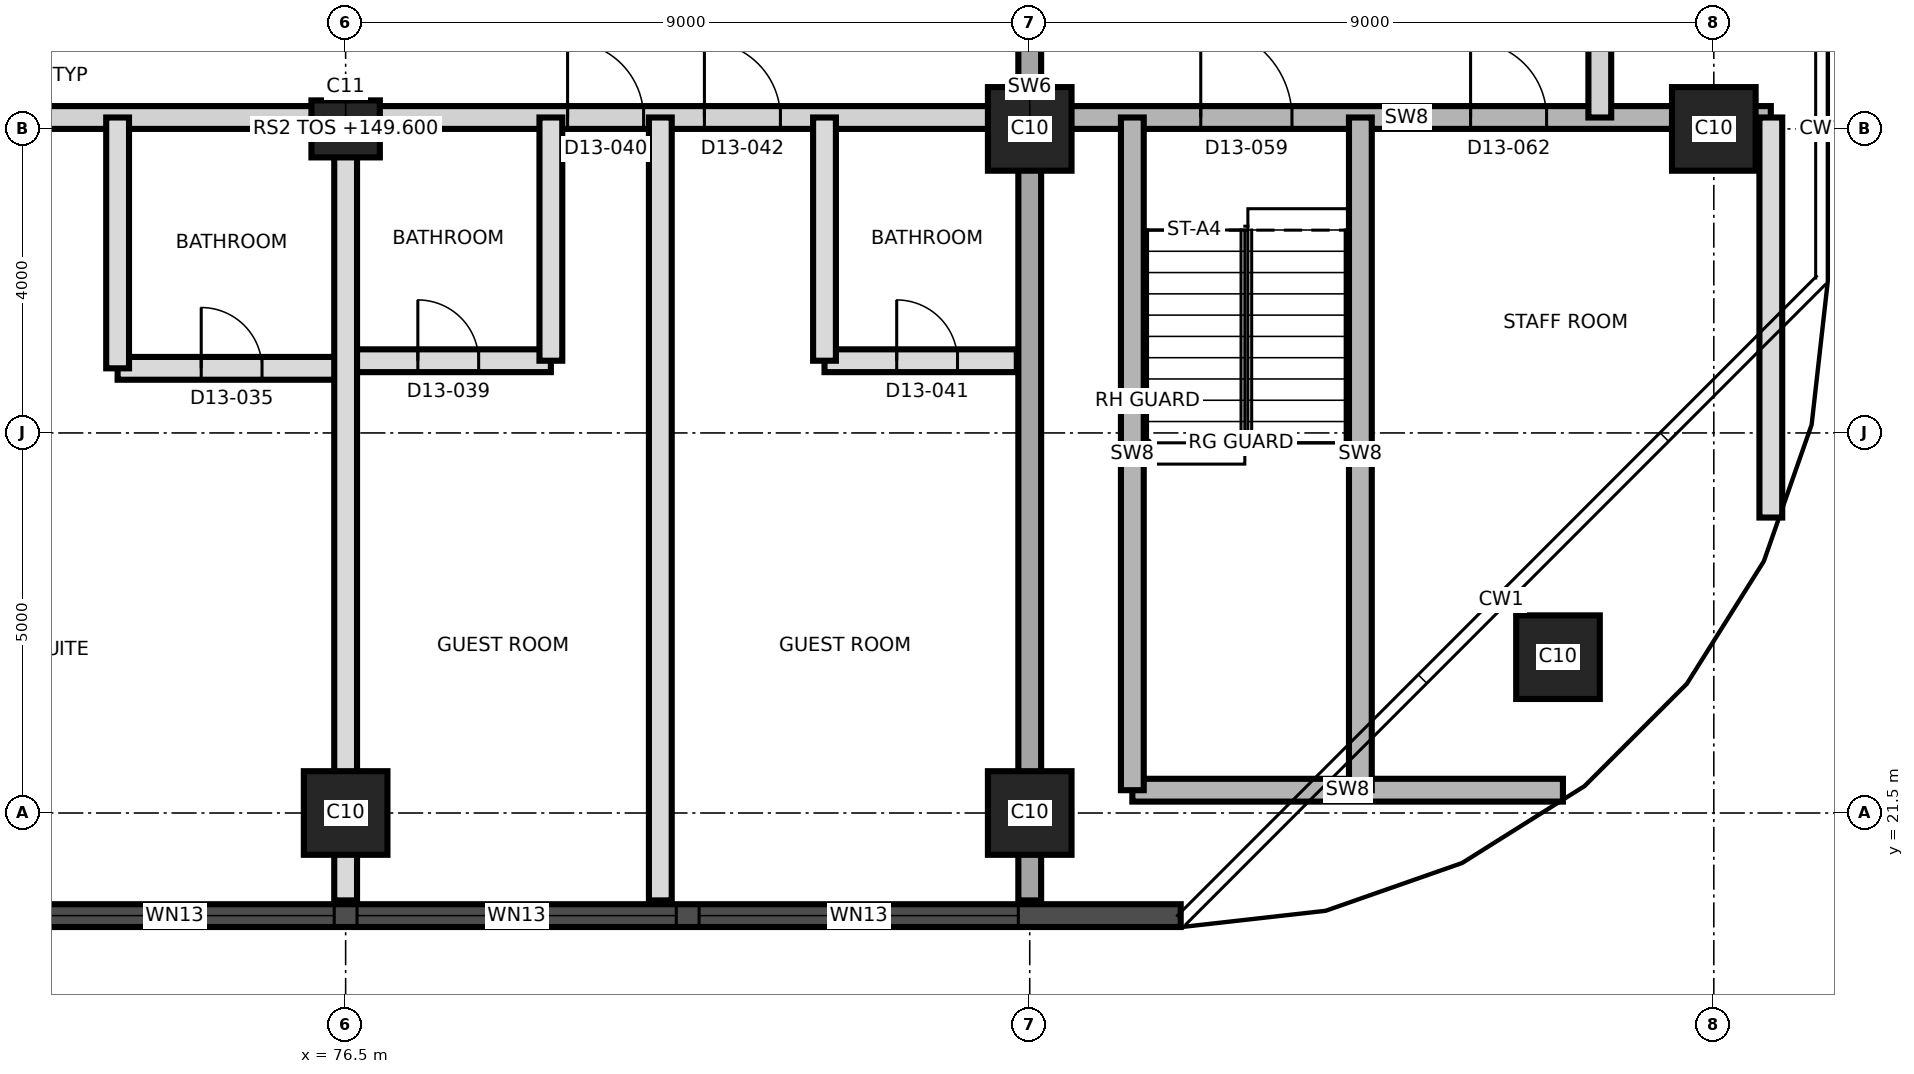
"""IFC4 building model, lengths in metres.
Left out: names, types, materials, properties, quantities, classifications, styles, units other than length and angle.
Written with IfcOpenShell. Run it as: python <this file> out.ifc"""

import sys

from ifc_helpers import new_model, si_unit, direction, frame, frame_2d, origin, origin_2d, place, context, subcontext, project, spatial, rectangle, extrude, element, fill, save


model = new_model("IFC4")
c1 = context("Model", 3, precision=1e-05, world=origin(), true_north=direction((0.0, 1.0)))
c2 = subcontext(c1, "Body", "Model", "MODEL_VIEW")
j1 = project(units=[si_unit("LENGTHUNIT", "METRE"), si_unit("PLANEANGLEUNIT", "RADIAN")], contexts=[c1])
p1 = place(None, origin())
s1 = spatial("IfcSite", under=j1, at=p1, CompositionType="ELEMENT")
p2 = place(p1, origin())
s2 = spatial("IfcBuilding", under=s1, at=p2, CompositionType="ELEMENT")
p3 = place(p2, frame((0.0, 0.0, 145.9)))
s3 = spatial("IfcBuildingStorey", under=s2, at=p3, CompositionType="ELEMENT", Elevation=145.9)
for number, where, z_axis, x_axis in (
    (1, (76.5, 21.5, 0.0), (0.0, 0.0, 1.0), (1.0, 0.0, 0.0)),
    (2, (85.5, 21.5, 0.0), (0.0, 0.0, 1.0), (1.0, 0.0, 0.0)),
    (3, (92.45, 23.55, 0.0), (0.0, 0.0, 1.0), (1.0, 0.0, 0.0)),
):
    element("IfcColumn", number, at=place(p3, frame(where, z_axis=z_axis, x_axis=x_axis)), inside=s3, PredefinedType="COLUMN", context=c2, shape_type="SweptSolid", body=[
        extrude(rectangle(XDim=1.1, YDim=1.1, at=origin_2d()), origin(), (0.0, 0.0, 1.0), 3.7),
    ])
p4 = place(p3, frame((76.5, 30.5, 0.0), z_axis=(0.0, 0.0, 1.0), x_axis=(1.0, 0.0, 0.0)))
e4 = element("IfcColumn", 4, at=p4, inside=s3, PredefinedType="COLUMN", context=c2, shape_type="SweptSolid", body=[
    extrude(rectangle(XDim=0.9, YDim=0.75, at=origin_2d()), origin(), (0.0, 0.0, 1.0), 3.7),
])
for number, where, z_axis, x_axis in (
    (5, (85.5, 30.5, 0.0), (0.0, 0.0, 1.0), (1.0, 0.0, 0.0)),
    (6, (94.5, 30.5, 0.0), (0.0, 0.0, 1.0), (1.0, 0.0, 0.0)),
):
    element("IfcColumn", number, at=place(p3, frame(where, z_axis=z_axis, x_axis=x_axis)), inside=s3, PredefinedType="COLUMN", context=c2, shape_type="SweptSolid", body=[
        extrude(rectangle(XDim=1.1, YDim=1.1, at=origin_2d()), origin(), (0.0, 0.0, 1.0), 3.7),
    ])
p5 = place(p3, frame((85.5, 20.35, 0.0), z_axis=(0.0, 0.0, 1.0), x_axis=(0.0, 1.0, 0.0)))
e7 = element("IfcWall", 7, at=p5, inside=s3, PredefinedType="SHEAR", context=c2, shape_type="SweptSolid", body=[
    extrude(rectangle(XDim=20.3, YDim=0.3, at=frame_2d((10.15, 0.0))), origin(), (0.0, 0.0, 1.0), 3.7),
])
p6 = place(p5, frame((11.35, 0.0, 0.0)))
e8 = element("IfcOpeningElement", 8, at=p6, cuts=e7, PredefinedType="OPENING", context=c2, shape_type="SweptSolid", body=[
    extrude(rectangle(XDim=1.4, YDim=2.1, at=frame_2d((0.7, 1.05))), frame((0.0, 0.16, 0.0), z_axis=(0.0, -1.0, 0.0), x_axis=(1.0, 0.0, 0.0)), (0.0, 0.0, 1.0), 0.32),
])
p7 = place(p3, frame((44.011, 20.15, 0.0), z_axis=(0.0, 0.0, 1.0), x_axis=(1.0, 0.0, 0.0)))
e9 = element("IfcWall", 9, at=p7, inside=s3, PredefinedType="SOLIDWALL", context=c2, shape_type="SweptSolid", body=[
    extrude(rectangle(XDim=43.476, YDim=0.3, at=frame_2d((21.738, 0.0))), origin(), (0.0, 0.0, 1.0), 3.4),
])
p8 = place(p7, frame((1.845, 0.0, 0.3)))
e10 = element("IfcOpeningElement", 10, at=p8, cuts=e9, PredefinedType="OPENING", context=c2, shape_type="SweptSolid", body=[
    extrude(rectangle(XDim=1.8, YDim=2.4, at=frame_2d((0.9, 1.2))), frame((0.0, 0.16, 0.0), z_axis=(0.0, -1.0, 0.0), x_axis=(1.0, 0.0, 0.0)), (0.0, 0.0, 1.0), 0.32),
])
p9 = place(p7, frame((5.639, 0.0, 0.9)))
e11 = element("IfcOpeningElement", 11, at=p9, cuts=e9, PredefinedType="OPENING", context=c2, shape_type="SweptSolid", body=[
    extrude(rectangle(XDim=4.2, YDim=1.7, at=frame_2d((2.1, 0.85))), frame((0.0, 0.16, 0.0), z_axis=(0.0, -1.0, 0.0), x_axis=(1.0, 0.0, 0.0)), (0.0, 0.0, 1.0), 0.32),
])
p10 = place(p7, frame((10.139, 0.0, 0.9)))
e12 = element("IfcOpeningElement", 12, at=p10, cuts=e9, PredefinedType="OPENING", context=c2, shape_type="SweptSolid", body=[
    extrude(rectangle(XDim=4.2, YDim=1.7, at=frame_2d((2.1, 0.85))), frame((0.0, 0.16, 0.0), z_axis=(0.0, -1.0, 0.0), x_axis=(1.0, 0.0, 0.0)), (0.0, 0.0, 1.0), 0.32),
])
p11 = place(p7, frame((14.639, 0.0, 0.9)))
e13 = element("IfcOpeningElement", 13, at=p11, cuts=e9, PredefinedType="OPENING", context=c2, shape_type="SweptSolid", body=[
    extrude(rectangle(XDim=4.2, YDim=1.7, at=frame_2d((2.1, 0.85))), frame((0.0, 0.16, 0.0), z_axis=(0.0, -1.0, 0.0), x_axis=(1.0, 0.0, 0.0)), (0.0, 0.0, 1.0), 0.32),
])
p12 = place(p7, frame((19.139, 0.0, 0.9)))
e14 = element("IfcOpeningElement", 14, at=p12, cuts=e9, PredefinedType="OPENING", context=c2, shape_type="SweptSolid", body=[
    extrude(rectangle(XDim=4.2, YDim=1.7, at=frame_2d((2.1, 0.85))), frame((0.0, 0.16, 0.0), z_axis=(0.0, -1.0, 0.0), x_axis=(1.0, 0.0, 0.0)), (0.0, 0.0, 1.0), 0.32),
])
p13 = place(p7, frame((23.639, 0.0, 0.9)))
e15 = element("IfcOpeningElement", 15, at=p13, cuts=e9, PredefinedType="OPENING", context=c2, shape_type="SweptSolid", body=[
    extrude(rectangle(XDim=4.2, YDim=1.7, at=frame_2d((2.1, 0.85))), frame((0.0, 0.16, 0.0), z_axis=(0.0, -1.0, 0.0), x_axis=(1.0, 0.0, 0.0)), (0.0, 0.0, 1.0), 0.32),
])
p14 = place(p7, frame((28.139, 0.0, 0.9)))
e16 = element("IfcOpeningElement", 16, at=p14, cuts=e9, PredefinedType="OPENING", context=c2, shape_type="SweptSolid", body=[
    extrude(rectangle(XDim=4.2, YDim=1.7, at=frame_2d((2.1, 0.85))), frame((0.0, 0.16, 0.0), z_axis=(0.0, -1.0, 0.0), x_axis=(1.0, 0.0, 0.0)), (0.0, 0.0, 1.0), 0.32),
])
p15 = place(p7, frame((32.639, 0.0, 0.9)))
e17 = element("IfcOpeningElement", 17, at=p15, cuts=e9, PredefinedType="OPENING", context=c2, shape_type="SweptSolid", body=[
    extrude(rectangle(XDim=4.2, YDim=1.7, at=frame_2d((2.1, 0.85))), frame((0.0, 0.16, 0.0), z_axis=(0.0, -1.0, 0.0), x_axis=(1.0, 0.0, 0.0)), (0.0, 0.0, 1.0), 0.32),
])
p16 = place(p7, frame((37.139, 0.0, 0.9)))
e18 = element("IfcOpeningElement", 18, at=p16, cuts=e9, PredefinedType="OPENING", context=c2, shape_type="SweptSolid", body=[
    extrude(rectangle(XDim=4.2, YDim=1.7, at=frame_2d((2.1, 0.85))), frame((0.0, 0.16, 0.0), z_axis=(0.0, -1.0, 0.0), x_axis=(1.0, 0.0, 0.0)), (0.0, 0.0, 1.0), 0.32),
])
p17 = place(p3, frame((86.85, 21.8, 0.0), z_axis=(0.0, 0.0, 1.0), x_axis=(1.0, 0.0, 0.0)))
e19 = element("IfcWall", 19, at=p17, inside=s3, PredefinedType="SHEAR", context=c2, shape_type="SweptSolid", body=[
    extrude(rectangle(XDim=5.665, YDim=0.3, at=frame_2d((2.833, 0.0))), origin(), (0.0, 0.0, 1.0), 3.4),
])
p18 = place(p3, frame((73.5, 27.35, 0.0), z_axis=(0.0, 0.0, 1.0), x_axis=(1.0, 0.0, 0.0)))
e20 = element("IfcWall", 20, at=p18, inside=s3, PredefinedType="PARTITIONING", context=c2, shape_type="SweptSolid", body=[
    extrude(rectangle(XDim=3.0, YDim=0.3, at=frame_2d((1.5, 0.0))), origin(), (0.0, 0.0, 1.0), 3.3),
])
p19 = place(p18, frame((1.1, 0.0, 0.0)))
e21 = element("IfcOpeningElement", 21, at=p19, cuts=e20, PredefinedType="OPENING", context=c2, shape_type="SweptSolid", body=[
    extrude(rectangle(XDim=0.8, YDim=2.1, at=frame_2d((0.4, 1.05))), frame((0.0, 0.16, 0.0), z_axis=(0.0, -1.0, 0.0), x_axis=(1.0, 0.0, 0.0)), (0.0, 0.0, 1.0), 0.32),
])
p20 = place(p3, frame((76.5, 27.45, 0.0), z_axis=(0.0, 0.0, 1.0), x_axis=(1.0, 0.0, 0.0)))
e22 = element("IfcWall", 22, at=p20, inside=s3, PredefinedType="PARTITIONING", context=c2, shape_type="SweptSolid", body=[
    extrude(rectangle(XDim=2.7, YDim=0.3, at=frame_2d((1.35, 0.0))), origin(), (0.0, 0.0, 1.0), 3.3),
])
p21 = place(p20, frame((0.95, 0.0, 0.0)))
e23 = element("IfcOpeningElement", 23, at=p21, cuts=e22, PredefinedType="OPENING", context=c2, shape_type="SweptSolid", body=[
    extrude(rectangle(XDim=0.8, YDim=2.1, at=frame_2d((0.4, 1.05))), frame((0.0, 0.16, 0.0), z_axis=(0.0, -1.0, 0.0), x_axis=(1.0, 0.0, 0.0)), (0.0, 0.0, 1.0), 0.32),
])
p22 = place(p3, frame((82.8, 27.45, 0.0), z_axis=(0.0, 0.0, 1.0), x_axis=(1.0, 0.0, 0.0)))
e24 = element("IfcWall", 24, at=p22, inside=s3, PredefinedType="PARTITIONING", context=c2, shape_type="SweptSolid", body=[
    extrude(rectangle(XDim=2.53, YDim=0.3, at=frame_2d((1.265, 0.0))), origin(), (0.0, 0.0, 1.0), 3.3),
])
p23 = place(p22, frame((0.95, 0.0, 0.0)))
e25 = element("IfcOpeningElement", 25, at=p23, cuts=e24, PredefinedType="OPENING", context=c2, shape_type="SweptSolid", body=[
    extrude(rectangle(XDim=0.8, YDim=2.1, at=frame_2d((0.4, 1.05))), frame((0.0, 0.16, 0.0), z_axis=(0.0, -1.0, 0.0), x_axis=(1.0, 0.0, 0.0)), (0.0, 0.0, 1.0), 0.32),
])
p24 = place(p3, frame((58.65, 30.65, 0.0), z_axis=(0.0, 0.0, 1.0), x_axis=(1.0, 0.0, 0.0)))
e26 = element("IfcWall", 26, at=p24, inside=s3, PredefinedType="PARTITIONING", context=c2, shape_type="SweptSolid", body=[
    extrude(rectangle(XDim=26.68, YDim=0.3, at=frame_2d((13.34, 0.0))), origin(), (0.0, 0.0, 1.0), 3.3),
])
p25 = place(p24, frame((2.2, 0.0, 0.0)))
e27 = element("IfcOpeningElement", 27, at=p25, cuts=e26, PredefinedType="OPENING", context=c2, shape_type="SweptSolid", body=[
    extrude(rectangle(XDim=1.0, YDim=2.4, at=frame_2d((0.5, 1.2))), frame((0.0, 0.16, 0.0), z_axis=(0.0, -1.0, 0.0), x_axis=(1.0, 0.0, 0.0)), (0.0, 0.0, 1.0), 0.32),
])
p26 = place(p24, frame((12.85, 0.0, 0.0)))
e28 = element("IfcOpeningElement", 28, at=p26, cuts=e26, PredefinedType="OPENING", context=c2, shape_type="SweptSolid", body=[
    extrude(rectangle(XDim=1.0, YDim=2.4, at=frame_2d((0.5, 1.2))), frame((0.0, 0.16, 0.0), z_axis=(0.0, -1.0, 0.0), x_axis=(1.0, 0.0, 0.0)), (0.0, 0.0, 1.0), 0.32),
])
p27 = place(p24, frame((20.77, 0.0, 0.0)))
e29 = element("IfcOpeningElement", 29, at=p27, cuts=e26, PredefinedType="OPENING", context=c2, shape_type="SweptSolid", body=[
    extrude(rectangle(XDim=1.0, YDim=2.1, at=frame_2d((0.5, 1.05))), frame((0.0, 0.16, 0.0), z_axis=(0.0, -1.0, 0.0), x_axis=(1.0, 0.0, 0.0)), (0.0, 0.0, 1.0), 0.32),
])
p28 = place(p24, frame((22.57, 0.0, 0.0)))
e30 = element("IfcOpeningElement", 30, at=p28, cuts=e26, PredefinedType="OPENING", context=c2, shape_type="SweptSolid", body=[
    extrude(rectangle(XDim=1.0, YDim=2.1, at=frame_2d((0.5, 1.05))), frame((0.0, 0.16, 0.0), z_axis=(0.0, -1.0, 0.0), x_axis=(1.0, 0.0, 0.0)), (0.0, 0.0, 1.0), 0.32),
])
p29 = place(p3, frame((85.67, 30.65, 0.0), z_axis=(0.0, 0.0, 1.0), x_axis=(1.0, 0.0, 0.0)))
e31 = element("IfcWall", 31, at=p29, inside=s3, PredefinedType="SHEAR", context=c2, shape_type="SweptSolid", body=[
    extrude(rectangle(XDim=9.58, YDim=0.3, at=frame_2d((4.79, 0.0))), origin(), (0.0, 0.0, 1.0), 3.4),
])
p30 = place(p29, frame((2.08, 0.0, 0.0)))
e32 = element("IfcOpeningElement", 32, at=p30, cuts=e31, PredefinedType="OPENING", context=c2, shape_type="SweptSolid", body=[
    extrude(rectangle(XDim=1.2, YDim=2.1, at=frame_2d((0.6, 1.05))), frame((0.0, 0.16, 0.0), z_axis=(0.0, -1.0, 0.0), x_axis=(1.0, 0.0, 0.0)), (0.0, 0.0, 1.0), 0.32),
])
p31 = place(p29, frame((5.63, 0.0, 0.0)))
e33 = element("IfcOpeningElement", 33, at=p31, cuts=e31, PredefinedType="OPENING", context=c2, shape_type="SweptSolid", body=[
    extrude(rectangle(XDim=1.0, YDim=2.1, at=frame_2d((0.5, 1.05))), frame((0.0, 0.16, 0.0), z_axis=(0.0, -1.0, 0.0), x_axis=(1.0, 0.0, 0.0)), (0.0, 0.0, 1.0), 0.32),
])
p32 = place(p3, frame((73.5, 27.35, 0.0), z_axis=(0.0, 0.0, 1.0), x_axis=(0.0, 1.0, 0.0)))
e34 = element("IfcWall", 34, at=p32, inside=s3, PredefinedType="PARTITIONING", context=c2, shape_type="SweptSolid", body=[
    extrude(rectangle(XDim=3.3, YDim=0.3, at=frame_2d((1.65, 0.0))), origin(), (0.0, 0.0, 1.0), 3.3),
])
p33 = place(p3, frame((76.5, 20.35, 0.0), z_axis=(0.0, 0.0, 1.0), x_axis=(0.0, 1.0, 0.0)))
e35 = element("IfcWall", 35, at=p33, inside=s3, PredefinedType="PARTITIONING", context=c2, shape_type="SweptSolid", body=[
    extrude(rectangle(XDim=10.3, YDim=0.3, at=frame_2d((5.15, 0.0))), origin(), (0.0, 0.0, 1.0), 3.3),
])
p34 = place(p3, frame((79.2, 27.45, 0.0), z_axis=(0.0, 0.0, 1.0), x_axis=(0.0, 1.0, 0.0)))
e36 = element("IfcWall", 36, at=p34, inside=s3, PredefinedType="PARTITIONING", context=c2, shape_type="SweptSolid", body=[
    extrude(rectangle(XDim=3.2, YDim=0.3, at=frame_2d((1.6, 0.0))), origin(), (0.0, 0.0, 1.0), 3.3),
])
p35 = place(p3, frame((80.64, 20.35, 0.0), z_axis=(0.0, 0.0, 1.0), x_axis=(0.0, 1.0, 0.0)))
e37 = element("IfcWall", 37, at=p35, inside=s3, PredefinedType="PARTITIONING", context=c2, shape_type="SweptSolid", body=[
    extrude(rectangle(XDim=10.3, YDim=0.3, at=frame_2d((5.15, 0.0))), origin(), (0.0, 0.0, 1.0), 3.3),
])
p36 = place(p3, frame((82.8, 27.45, 0.0), z_axis=(0.0, 0.0, 1.0), x_axis=(0.0, 1.0, 0.0)))
e38 = element("IfcWall", 38, at=p36, inside=s3, PredefinedType="PARTITIONING", context=c2, shape_type="SweptSolid", body=[
    extrude(rectangle(XDim=3.2, YDim=0.3, at=frame_2d((1.6, 0.0))), origin(), (0.0, 0.0, 1.0), 3.3),
])
for number, where, z_axis, x_axis in (
    (39, (86.85, 21.8, 0.0), (0.0, 0.0, 1.0), (0.0, 1.0, 0.0)),
    (40, (89.85, 21.8, 0.0), (0.0, 0.0, 1.0), (0.0, 1.0, 0.0)),
):
    element("IfcWall", number, at=place(p3, frame(where, z_axis=z_axis, x_axis=x_axis)), inside=s3, PredefinedType="SHEAR", context=c2, shape_type="SweptSolid", body=[
        extrude(rectangle(XDim=8.85, YDim=0.3, at=frame_2d((4.425, 0.0))), origin(), (0.0, 0.0, 1.0), 3.4),
    ])
p37 = place(p3, frame((93.0, 30.65, 0.0), z_axis=(0.0, 0.0, 1.0), x_axis=(0.0, 1.0, 0.0)))
e41 = element("IfcWall", 41, at=p37, inside=s3, PredefinedType="PARTITIONING", context=c2, shape_type="SweptSolid", body=[
    extrude(rectangle(XDim=2.7, YDim=0.3, at=frame_2d((1.35, 0.0))), origin(), (0.0, 0.0, 1.0), 3.4),
])
p38 = place(p3, frame((95.25, 25.387, 0.0), z_axis=(0.0, 0.0, 1.0), x_axis=(0.0, 1.0, 0.0)))
e42 = element("IfcWall", 42, at=p38, inside=s3, PredefinedType="PARTITIONING", context=c2, shape_type="SweptSolid", body=[
    extrude(rectangle(XDim=5.263, YDim=0.3, at=frame_2d((2.631, 0.0))), origin(), (0.0, 0.0, 1.0), 3.4),
])
p39 = place(p14, origin())
e43 = element("IfcWindow", 43, at=p39, inside=s3, PartitioningType="SINGLE_PANEL", PredefinedType="WINDOW", context=c2, shape_type="SweptSolid", body=[
    extrude(rectangle(XDim=4.2, YDim=1.7, at=frame_2d((2.1, 0.85))), frame((0.0, 0.03, 0.0), z_axis=(0.0, -1.0, 0.0), x_axis=(1.0, 0.0, 0.0)), (0.0, 0.0, 1.0), 0.06),
])
fill(e16, e43)
p40 = place(p15, origin())
e44 = element("IfcWindow", 44, at=p40, inside=s3, PartitioningType="SINGLE_PANEL", PredefinedType="WINDOW", context=c2, shape_type="SweptSolid", body=[
    extrude(rectangle(XDim=4.2, YDim=1.7, at=frame_2d((2.1, 0.85))), frame((0.0, 0.03, 0.0), z_axis=(0.0, -1.0, 0.0), x_axis=(1.0, 0.0, 0.0)), (0.0, 0.0, 1.0), 0.06),
])
fill(e17, e44)
p41 = place(p16, origin())
e45 = element("IfcWindow", 45, at=p41, inside=s3, PartitioningType="SINGLE_PANEL", PredefinedType="WINDOW", context=c2, shape_type="SweptSolid", body=[
    extrude(rectangle(XDim=4.2, YDim=1.7, at=frame_2d((2.1, 0.85))), frame((0.0, 0.03, 0.0), z_axis=(0.0, -1.0, 0.0), x_axis=(1.0, 0.0, 0.0)), (0.0, 0.0, 1.0), 0.06),
])
fill(e18, e45)
p42 = place(p19, origin())
e46 = element("IfcDoor", 46, at=p42, inside=s3, OperationType="SINGLE_SWING_LEFT", PredefinedType="DOOR", context=c2, shape_type="SweptSolid", body=[
    extrude(rectangle(XDim=0.8, YDim=2.1, at=frame_2d((0.4, 1.05))), frame((0.0, 0.025, 0.0), z_axis=(0.0, -1.0, 0.0), x_axis=(1.0, 0.0, 0.0)), (0.0, 0.0, 1.0), 0.05),
])
fill(e21, e46)
p43 = place(p21, origin())
e47 = element("IfcDoor", 47, at=p43, inside=s3, OperationType="SINGLE_SWING_RIGHT", PredefinedType="DOOR", context=c2, shape_type="SweptSolid", body=[
    extrude(rectangle(XDim=0.8, YDim=2.1, at=frame_2d((0.4, 1.05))), frame((0.0, 0.025, 0.0), z_axis=(0.0, -1.0, 0.0), x_axis=(1.0, 0.0, 0.0)), (0.0, 0.0, 1.0), 0.05),
])
fill(e23, e47)
p44 = place(p27, origin())
e48 = element("IfcDoor", 48, at=p44, inside=s3, OperationType="SINGLE_SWING_LEFT", PredefinedType="DOOR", context=c2, shape_type="SweptSolid", body=[
    extrude(rectangle(XDim=1.0, YDim=2.1, at=frame_2d((0.5, 1.05))), frame((0.0, 0.025, 0.0), z_axis=(0.0, -1.0, 0.0), x_axis=(1.0, 0.0, 0.0)), (0.0, 0.0, 1.0), 0.05),
])
fill(e29, e48)
p45 = place(p23, origin())
e49 = element("IfcDoor", 49, at=p45, inside=s3, OperationType="SINGLE_SWING_LEFT", PredefinedType="DOOR", context=c2, shape_type="SweptSolid", body=[
    extrude(rectangle(XDim=0.8, YDim=2.1, at=frame_2d((0.4, 1.05))), frame((0.0, 0.025, 0.0), z_axis=(0.0, -1.0, 0.0), x_axis=(1.0, 0.0, 0.0)), (0.0, 0.0, 1.0), 0.05),
])
fill(e25, e49)
p46 = place(p28, origin())
e50 = element("IfcDoor", 50, at=p46, inside=s3, OperationType="SINGLE_SWING_LEFT", PredefinedType="DOOR", context=c2, shape_type="SweptSolid", body=[
    extrude(rectangle(XDim=1.0, YDim=2.1, at=frame_2d((0.5, 1.05))), frame((0.0, 0.025, 0.0), z_axis=(0.0, -1.0, 0.0), x_axis=(1.0, 0.0, 0.0)), (0.0, 0.0, 1.0), 0.05),
])
fill(e30, e50)
p47 = place(p30, origin())
e51 = element("IfcDoor", 51, at=p47, inside=s3, OperationType="SINGLE_SWING_LEFT", PredefinedType="DOOR", context=c2, shape_type="SweptSolid", body=[
    extrude(rectangle(XDim=1.2, YDim=2.1, at=frame_2d((0.6, 1.05))), frame((0.0, 0.025, 0.0), z_axis=(0.0, -1.0, 0.0), x_axis=(1.0, 0.0, 0.0)), (0.0, 0.0, 1.0), 0.05),
])
fill(e32, e51)
p48 = place(p31, origin())
e52 = element("IfcDoor", 52, at=p48, inside=s3, OperationType="SINGLE_SWING_LEFT", PredefinedType="DOOR", context=c2, shape_type="SweptSolid", body=[
    extrude(rectangle(XDim=1.0, YDim=2.1, at=frame_2d((0.5, 1.05))), frame((0.0, 0.025, 0.0), z_axis=(0.0, -1.0, 0.0), x_axis=(1.0, 0.0, 0.0)), (0.0, 0.0, 1.0), 0.05),
])
fill(e33, e52)
save(model, sys.argv[1])
